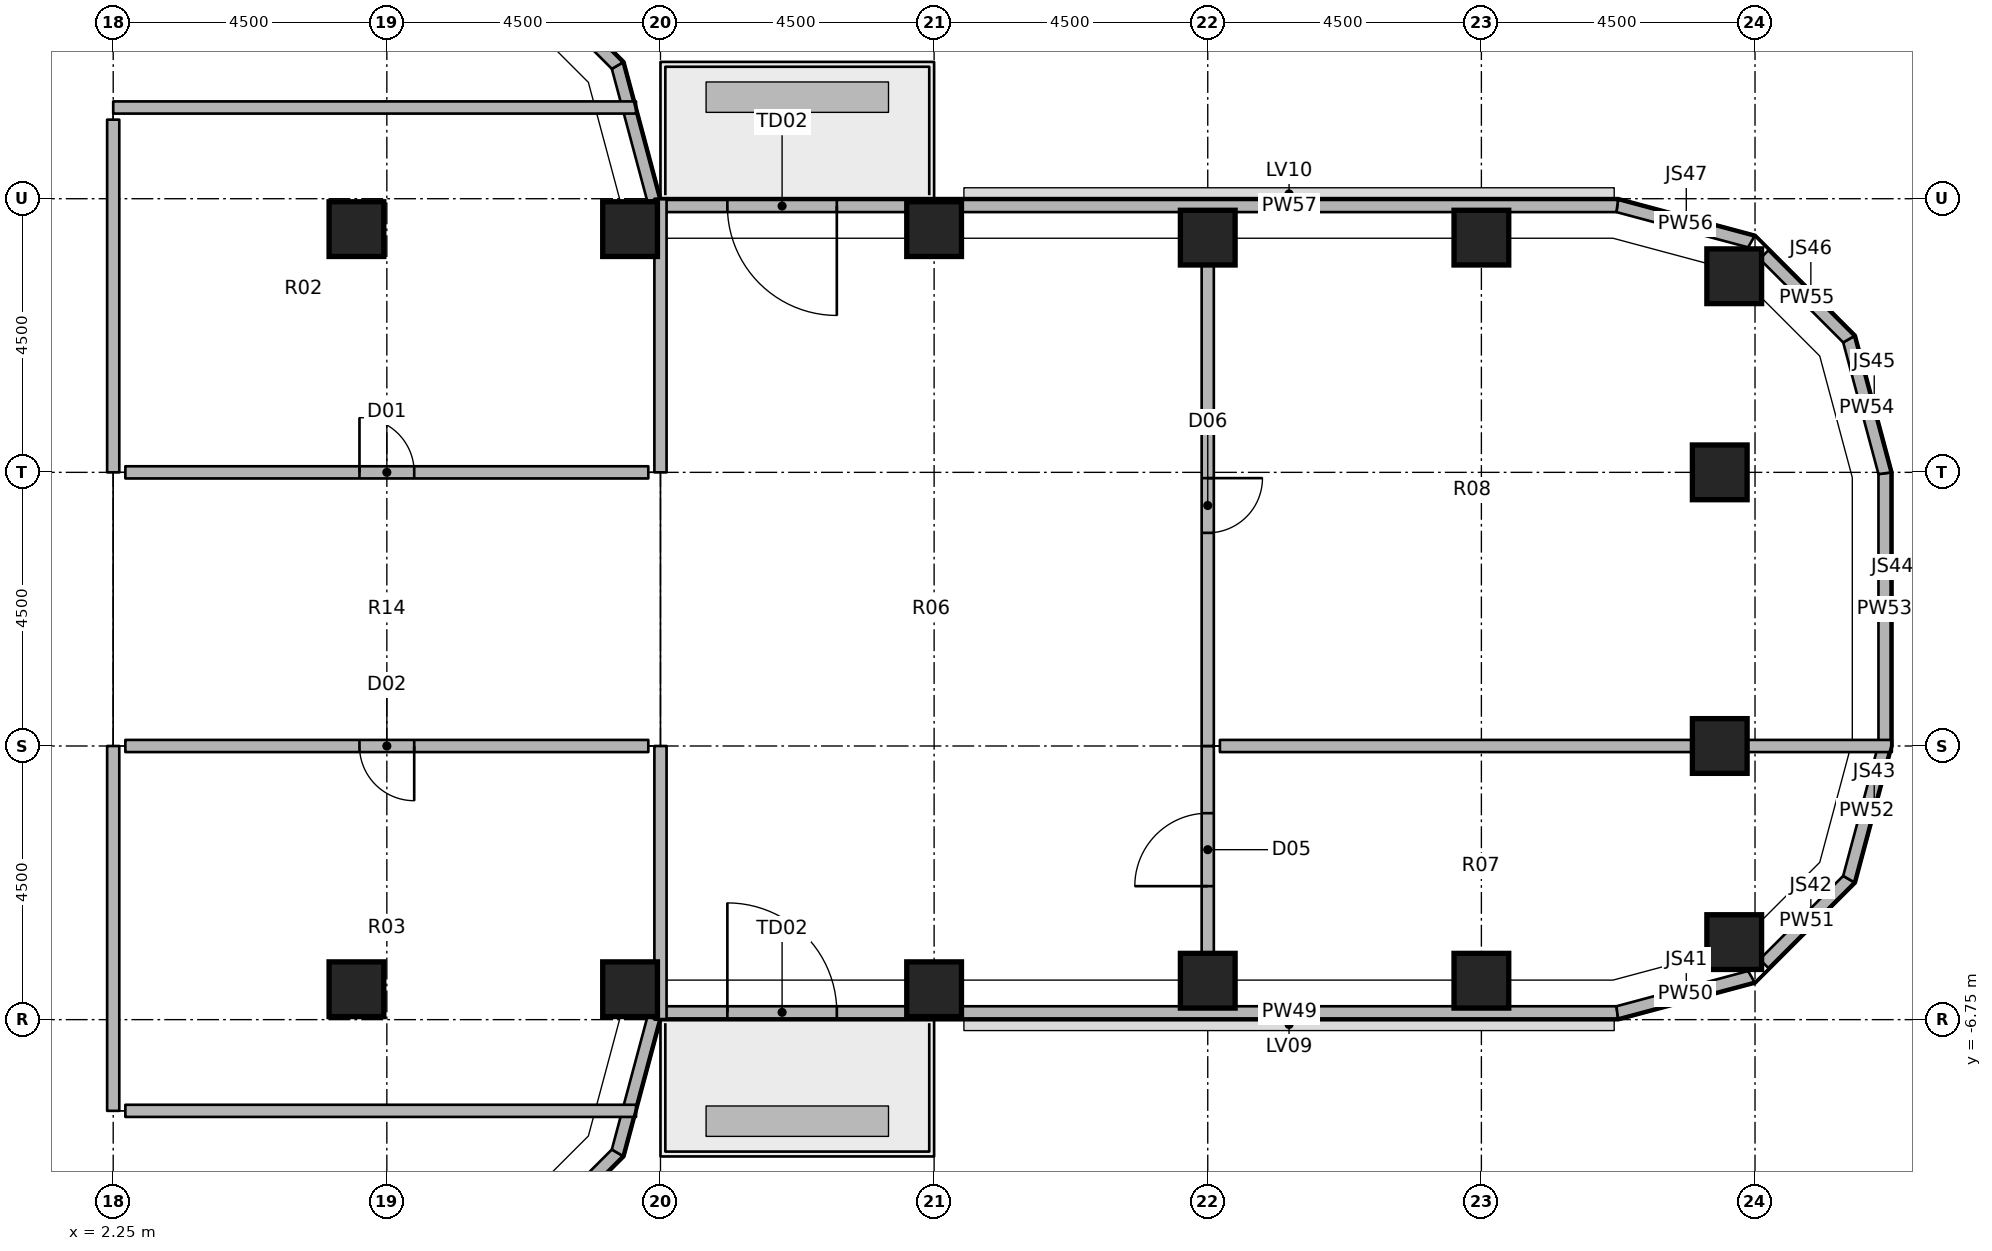
"""IFC4 building model, lengths in metres.
Left out: names, types, materials, properties, quantities, classifications, styles, units other than length and angle.
Written with IfcOpenShell. Run it as: python <this file> out.ifc"""

import sys

from ifc_helpers import new_model, si_unit, direction, frame, frame_2d, origin, origin_2d, place, context, subcontext, project, spatial, polyline, rectangle, outline, extrude, element, fill, save


model = new_model("IFC4")
c1 = context("Model", 3, precision=1e-05, world=origin(), true_north=direction((0.0, 1.0)))
c2 = subcontext(c1, "Body", "Model", "MODEL_VIEW")
j1 = project(units=[si_unit("LENGTHUNIT", "METRE"), si_unit("PLANEANGLEUNIT", "RADIAN")], contexts=[c1])
p1 = place(None, origin())
s1 = spatial("IfcSite", under=j1, at=p1, CompositionType="ELEMENT")
p2 = place(p1, origin())
s2 = spatial("IfcBuilding", under=s1, at=p2, CompositionType="ELEMENT")
p3 = place(p2, frame((0.0, 0.0, 136.0)))
s3 = spatial("IfcBuildingStorey", under=s2, at=p3, CompositionType="ELEMENT", Elevation=136.0)
for number, where, z_axis, x_axis in (
    (1, (6.25, -6.25, 0.0), (0.0, 0.0, 1.0), (1.0, 0.0, 0.0)),
    (2, (6.25, 6.25, 0.0), (0.0, 0.0, 1.0), (1.0, 0.0, 0.0)),
    (3, (10.75, -6.25, 0.0), (0.0, 0.0, 1.0), (1.0, 0.0, 0.0)),
    (4, (10.75, 6.25, 0.0), (0.0, 0.0, 1.0), (1.0, 0.0, 0.0)),
    (5, (15.75, -6.25, 0.0), (0.0, 0.0, 1.0), (1.0, 0.0, 0.0)),
    (6, (15.75, 6.25, 0.0), (0.0, 0.0, 1.0), (1.0, 0.0, 0.0)),
    (7, (20.25, -6.11, 0.0), (0.0, 0.0, 1.0), (1.0, 0.0, 0.0)),
    (8, (20.25, 6.11, 0.0), (0.0, 0.0, 1.0), (1.0, 0.0, 0.0)),
    (9, (24.75, -6.11, 0.0), (0.0, 0.0, 1.0), (1.0, 0.0, 0.0)),
    (10, (24.75, 6.11, 0.0), (0.0, 0.0, 1.0), (1.0, 0.0, 0.0)),
    (11, (28.908, -5.475, 0.0), (0.0, 0.0, 1.0), (1.0, 0.0, 0.0)),
    (12, (28.67, -2.25, 0.0), (0.0, 0.0, 1.0), (1.0, 0.0, 0.0)),
    (13, (28.67, 2.25, 0.0), (0.0, 0.0, 1.0), (1.0, 0.0, 0.0)),
    (14, (28.908, 5.475, 0.0), (0.0, 0.0, 1.0), (1.0, 0.0, 0.0)),
):
    element("IfcColumn", number, at=place(p3, frame(where, z_axis=z_axis, x_axis=x_axis)), inside=s3, PredefinedType="COLUMN", context=c2, shape_type="SweptSolid", body=[
        extrude(rectangle(XDim=0.9, YDim=0.9, at=origin_2d()), origin(), (0.0, 0.0, 1.0), 4.85),
    ])
p4 = place(p3, origin())
e15 = element("IfcWall", 15, at=p4, inside=s3, PredefinedType="SOLIDWALL", context=c2, shape_type="SweptSolid", body=[
    extrude(outline(polyline([(8.99, -10.629), (10.629, -8.99), (10.45, -8.886), (8.886, -10.45), (8.99, -10.629)])), origin(), (0.0, 0.0, 1.0), 4.85),
])
p5 = place(p3, origin())
e16 = element("IfcWall", 16, at=p5, inside=s3, PredefinedType="SOLIDWALL", context=c2, shape_type="SweptSolid", body=[
    extrude(outline(polyline([(10.629, -8.99), (11.229, -6.752), (11.035, -6.701), (10.45, -8.886), (10.629, -8.99)])), origin(), (0.0, 0.0, 1.0), 4.85),
])
p6 = place(p3, frame((11.2, -6.63, 0.0), z_axis=(0.0, 0.0, 1.0), x_axis=(1.0, 0.0, 0.0)))
e17 = element("IfcWall", 17, at=p6, inside=s3, PredefinedType="SOLIDWALL", context=c2, shape_type="SweptSolid", body=[
    extrude(rectangle(XDim=4.1, YDim=0.2, at=frame_2d((2.05, 0.0))), origin(), (0.0, 0.0, 1.0), 4.85),
])
p7 = place(p6, frame((1.15, 0.0, 0.0)))
e18 = element("IfcOpeningElement", 18, at=p7, cuts=e17, PredefinedType="OPENING", context=c2, shape_type="SweptSolid", body=[
    extrude(rectangle(XDim=1.8, YDim=2.4, at=frame_2d((0.9, 1.2))), frame((0.0, 0.11, 0.0), z_axis=(0.0, -1.0, 0.0), x_axis=(1.0, 0.0, 0.0)), (0.0, 0.0, 1.0), 0.22),
])
p8 = place(p3, origin())
e19 = element("IfcWall", 19, at=p8, inside=s3, PredefinedType="SOLIDWALL", context=c2, shape_type="SweptSolid", body=[
    extrude(outline(polyline([(16.2, -6.73), (26.997, -6.73), (26.971, -6.53), (16.2, -6.53), (16.2, -6.73)])), origin(), (0.0, 0.0, 1.0), 4.85),
])
p9 = place(p3, origin())
e20 = element("IfcWall", 20, at=p9, inside=s3, PredefinedType="SOLIDWALL", context=c2, shape_type="SweptSolid", body=[
    extrude(outline(polyline([(26.997, -6.73), (29.24, -6.129), (29.136, -5.95), (26.971, -6.53), (26.997, -6.73)])), origin(), (0.0, 0.0, 1.0), 4.85),
])
p10 = place(p3, origin())
e21 = element("IfcWall", 21, at=p10, inside=s3, PredefinedType="SOLIDWALL", context=c2, shape_type="SweptSolid", body=[
    extrude(outline(polyline([(29.469, -5.9), (30.879, -4.49), (30.7, -4.386), (29.327, -5.759), (29.469, -5.9)])), origin(), (0.0, 0.0, 1.0), 4.85),
])
p11 = place(p3, origin())
e22 = element("IfcWall", 22, at=p11, inside=s3, PredefinedType="SOLIDWALL", context=c2, shape_type="SweptSolid", body=[
    extrude(outline(polyline([(30.879, -4.49), (31.48, -2.247), (31.28, -2.221), (30.7, -4.386), (30.879, -4.49)])), origin(), (0.0, 0.0, 1.0), 4.85),
])
p12 = place(p3, origin())
e23 = element("IfcWall", 23, at=p12, inside=s3, PredefinedType="SOLIDWALL", context=c2, shape_type="SweptSolid", body=[
    extrude(outline(polyline([(31.48, -2.247), (31.48, 2.247), (31.28, 2.221), (31.28, -2.221), (31.48, -2.247)])), origin(), (0.0, 0.0, 1.0), 4.85),
])
p13 = place(p3, origin())
e24 = element("IfcWall", 24, at=p13, inside=s3, PredefinedType="SOLIDWALL", context=c2, shape_type="SweptSolid", body=[
    extrude(outline(polyline([(31.48, 2.247), (30.879, 4.49), (30.7, 4.386), (31.28, 2.221), (31.48, 2.247)])), origin(), (0.0, 0.0, 1.0), 4.85),
])
p14 = place(p3, origin())
e25 = element("IfcWall", 25, at=p14, inside=s3, PredefinedType="SOLIDWALL", context=c2, shape_type="SweptSolid", body=[
    extrude(outline(polyline([(30.879, 4.49), (29.469, 5.9), (29.327, 5.759), (30.7, 4.386), (30.879, 4.49)])), origin(), (0.0, 0.0, 1.0), 4.85),
])
p15 = place(p3, origin())
e26 = element("IfcWall", 26, at=p15, inside=s3, PredefinedType="SOLIDWALL", context=c2, shape_type="SweptSolid", body=[
    extrude(outline(polyline([(29.24, 6.129), (26.997, 6.73), (26.971, 6.53), (29.136, 5.95), (29.24, 6.129)])), origin(), (0.0, 0.0, 1.0), 4.85),
])
p16 = place(p3, origin())
e27 = element("IfcWall", 27, at=p16, inside=s3, PredefinedType="SOLIDWALL", context=c2, shape_type="SweptSolid", body=[
    extrude(outline(polyline([(26.997, 6.73), (16.2, 6.73), (16.2, 6.53), (26.971, 6.53), (26.997, 6.73)])), origin(), (0.0, 0.0, 1.0), 4.85),
])
p17 = place(p3, frame((15.3, 6.63, 0.0), z_axis=(0.0, 0.0, 1.0), x_axis=(-1.0, 0.0, 0.0)))
e28 = element("IfcWall", 28, at=p17, inside=s3, PredefinedType="SOLIDWALL", context=c2, shape_type="SweptSolid", body=[
    extrude(rectangle(XDim=4.1, YDim=0.2, at=frame_2d((2.05, 0.0))), origin(), (0.0, 0.0, 1.0), 4.85),
])
p18 = place(p17, frame((1.15, 0.0, 0.0)))
e29 = element("IfcOpeningElement", 29, at=p18, cuts=e28, PredefinedType="OPENING", context=c2, shape_type="SweptSolid", body=[
    extrude(rectangle(XDim=1.8, YDim=2.4, at=frame_2d((0.9, 1.2))), frame((0.0, 0.11, 0.0), z_axis=(0.0, -1.0, 0.0), x_axis=(1.0, 0.0, 0.0)), (0.0, 0.0, 1.0), 0.22),
])
p19 = place(p3, origin())
e30 = element("IfcWall", 30, at=p19, inside=s3, PredefinedType="SOLIDWALL", context=c2, shape_type="SweptSolid", body=[
    extrude(outline(polyline([(11.229, 6.752), (10.629, 8.99), (10.45, 8.886), (11.035, 6.701), (11.229, 6.752)])), origin(), (0.0, 0.0, 1.0), 4.85),
])
p20 = place(p3, origin())
e31 = element("IfcWall", 31, at=p20, inside=s3, PredefinedType="SOLIDWALL", context=c2, shape_type="SweptSolid", body=[
    extrude(outline(polyline([(10.629, 8.99), (8.99, 10.629), (8.886, 10.45), (10.45, 8.886), (10.629, 8.99)])), origin(), (0.0, 0.0, 1.0), 4.85),
])
p21 = place(p3, frame((10.848, 8.25, 0.0), z_axis=(0.0, 0.0, 1.0), x_axis=(-1.0, 0.0, 0.0)))
e32 = element("IfcWall", 32, at=p21, inside=s3, PredefinedType="PARTITIONING", context=c2, shape_type="SweptSolid", body=[
    extrude(rectangle(XDim=8.598, YDim=0.2, at=frame_2d((4.299, 0.0))), origin(), (0.0, 0.0, 1.0), 3.93),
])
p22 = place(p3, frame((2.25, 8.05, 0.0), z_axis=(0.0, 0.0, 1.0), x_axis=(0.0, -1.0, 0.0)))
e33 = element("IfcWall", 33, at=p22, inside=s3, PredefinedType="PARTITIONING", context=c2, shape_type="SweptSolid", body=[
    extrude(rectangle(XDim=5.8, YDim=0.2, at=frame_2d((2.9, 0.0))), origin(), (0.0, 0.0, 1.0), 3.994),
])
p23 = place(p3, frame((2.25, -2.25, 0.0), z_axis=(0.0, 0.0, 1.0), x_axis=(0.0, -1.0, 0.0)))
e34 = element("IfcWall", 34, at=p23, inside=s3, PredefinedType="PARTITIONING", context=c2, shape_type="SweptSolid", body=[
    extrude(rectangle(XDim=6.0, YDim=0.2, at=frame_2d((3.0, 0.0))), origin(), (0.0, 0.0, 1.0), 3.994),
])
p24 = place(p3, frame((2.45, -8.25, 0.0), z_axis=(0.0, 0.0, 1.0), x_axis=(1.0, 0.0, 0.0)))
e35 = element("IfcWall", 35, at=p24, inside=s3, PredefinedType="PARTITIONING", context=c2, shape_type="SweptSolid", body=[
    extrude(rectangle(XDim=8.398, YDim=0.2, at=frame_2d((4.199, 0.0))), origin(), (0.0, 0.0, 1.0), 3.93),
])
p25 = place(p3, frame((11.25, 6.75, 0.0), z_axis=(0.0, 0.0, 1.0), x_axis=(0.0, -1.0, 0.0)))
e36 = element("IfcWall", 36, at=p25, inside=s3, PredefinedType="PARTITIONING", context=c2, shape_type="SweptSolid", body=[
    extrude(rectangle(XDim=4.5, YDim=0.2, at=frame_2d((2.25, 0.0))), origin(), (0.0, 0.0, 1.0), 3.93),
])
p26 = place(p3, frame((2.45, 2.25, 0.0), z_axis=(0.0, 0.0, 1.0), x_axis=(1.0, 0.0, 0.0)))
e37 = element("IfcWall", 37, at=p26, inside=s3, PredefinedType="PARTITIONING", context=c2, shape_type="SweptSolid", body=[
    extrude(rectangle(XDim=8.6, YDim=0.2, at=frame_2d((4.3, 0.0))), origin(), (0.0, 0.0, 1.0), 4.081),
])
p27 = place(p26, frame((3.85, 0.0, 0.0)))
e38 = element("IfcOpeningElement", 38, at=p27, cuts=e37, PredefinedType="OPENING", context=c2, shape_type="SweptSolid", body=[
    extrude(rectangle(XDim=0.9, YDim=2.1, at=frame_2d((0.45, 1.05))), frame((0.0, 0.11, 0.0), z_axis=(0.0, -1.0, 0.0), x_axis=(1.0, 0.0, 0.0)), (0.0, 0.0, 1.0), 0.22),
])
p28 = place(p3, frame((11.25, -2.25, 0.0), z_axis=(0.0, 0.0, 1.0), x_axis=(0.0, -1.0, 0.0)))
e39 = element("IfcWall", 39, at=p28, inside=s3, PredefinedType="PARTITIONING", context=c2, shape_type="SweptSolid", body=[
    extrude(rectangle(XDim=4.5, YDim=0.2, at=frame_2d((2.25, 0.0))), origin(), (0.0, 0.0, 1.0), 3.93),
])
p29 = place(p3, frame((11.05, -2.25, 0.0), z_axis=(0.0, 0.0, 1.0), x_axis=(-1.0, 0.0, 0.0)))
e40 = element("IfcWall", 40, at=p29, inside=s3, PredefinedType="PARTITIONING", context=c2, shape_type="SweptSolid", body=[
    extrude(rectangle(XDim=8.6, YDim=0.2, at=frame_2d((4.3, 0.0))), origin(), (0.0, 0.0, 1.0), 4.081),
])
p30 = place(p29, frame((3.85, 0.0, 0.0)))
e41 = element("IfcOpeningElement", 41, at=p30, cuts=e40, PredefinedType="OPENING", context=c2, shape_type="SweptSolid", body=[
    extrude(rectangle(XDim=0.9, YDim=2.1, at=frame_2d((0.45, 1.05))), frame((0.0, 0.11, 0.0), z_axis=(0.0, -1.0, 0.0), x_axis=(1.0, 0.0, 0.0)), (0.0, 0.0, 1.0), 0.22),
])
p31 = place(p3, frame((20.25, -5.66, 0.0), z_axis=(0.0, 0.0, 1.0), x_axis=(0.0, 1.0, 0.0)))
e42 = element("IfcWall", 42, at=p31, inside=s3, PredefinedType="PARTITIONING", context=c2, shape_type="SweptSolid", body=[
    extrude(rectangle(XDim=3.41, YDim=0.2, at=frame_2d((1.705, 0.0))), origin(), (0.0, 0.0, 1.0), 4.081),
])
p32 = place(p31, frame((1.105, 0.0, 0.0)))
e43 = element("IfcOpeningElement", 43, at=p32, cuts=e42, PredefinedType="OPENING", context=c2, shape_type="SweptSolid", body=[
    extrude(rectangle(XDim=1.2, YDim=2.1, at=frame_2d((0.6, 1.05))), frame((0.0, 0.11, 0.0), z_axis=(0.0, -1.0, 0.0), x_axis=(1.0, 0.0, 0.0)), (0.0, 0.0, 1.0), 0.22),
])
p33 = place(p3, frame((20.25, 5.66, 0.0), z_axis=(0.0, 0.0, 1.0), x_axis=(0.0, -1.0, 0.0)))
e44 = element("IfcWall", 44, at=p33, inside=s3, PredefinedType="PARTITIONING", context=c2, shape_type="SweptSolid", body=[
    extrude(rectangle(XDim=7.91, YDim=0.2, at=frame_2d((3.955, 0.0))), origin(), (0.0, 0.0, 1.0), 4.081),
])
p34 = place(p33, frame((3.505, 0.0, 0.0)))
e45 = element("IfcOpeningElement", 45, at=p34, cuts=e44, PredefinedType="OPENING", context=c2, shape_type="SweptSolid", body=[
    extrude(rectangle(XDim=0.9, YDim=2.1, at=frame_2d((0.45, 1.05))), frame((0.0, 0.11, 0.0), z_axis=(0.0, -1.0, 0.0), x_axis=(1.0, 0.0, 0.0)), (0.0, 0.0, 1.0), 0.22),
])
p35 = place(p3, frame((20.45, -2.25, 0.0), z_axis=(0.0, 0.0, 1.0), x_axis=(1.0, 0.0, 0.0)))
e46 = element("IfcWall", 46, at=p35, inside=s3, PredefinedType="PARTITIONING", context=c2, shape_type="SweptSolid", body=[
    extrude(rectangle(XDim=7.77, YDim=0.2, at=frame_2d((3.885, 0.0))), origin(), (0.0, 0.0, 1.0), 4.081),
])
p36 = place(p3, frame((29.12, -2.25, 0.0), z_axis=(0.0, 0.0, 1.0), x_axis=(1.0, 0.0, 0.0)))
e47 = element("IfcWall", 47, at=p36, inside=s3, PredefinedType="PARTITIONING", context=c2, shape_type="SweptSolid", body=[
    extrude(rectangle(XDim=2.38, YDim=0.2, at=frame_2d((1.19, 0.0))), origin(), (0.0, 0.0, 1.0), 3.994),
])
p37 = place(p7, origin())
e48 = element("IfcDoor", 48, at=p37, inside=s3, OperationType="SINGLE_SWING_LEFT", PredefinedType="DOOR", context=c2, shape_type="SweptSolid", body=[
    extrude(rectangle(XDim=1.8, YDim=2.4, at=frame_2d((0.9, 1.2))), frame((0.0, 0.025, 0.0), z_axis=(0.0, -1.0, 0.0), x_axis=(1.0, 0.0, 0.0)), (0.0, 0.0, 1.0), 0.05),
])
fill(e18, e48)
p38 = place(p18, origin())
e49 = element("IfcDoor", 49, at=p38, inside=s3, OperationType="SINGLE_SWING_LEFT", PredefinedType="DOOR", context=c2, shape_type="SweptSolid", body=[
    extrude(rectangle(XDim=1.8, YDim=2.4, at=frame_2d((0.9, 1.2))), frame((0.0, 0.025, 0.0), z_axis=(0.0, -1.0, 0.0), x_axis=(1.0, 0.0, 0.0)), (0.0, 0.0, 1.0), 0.05),
])
fill(e29, e49)
p39 = place(p27, origin())
e50 = element("IfcDoor", 50, at=p39, inside=s3, OperationType="SINGLE_SWING_LEFT", PredefinedType="DOOR", context=c2, shape_type="SweptSolid", body=[
    extrude(rectangle(XDim=0.9, YDim=2.1, at=frame_2d((0.45, 1.05))), frame((0.0, 0.025, 0.0), z_axis=(0.0, -1.0, 0.0), x_axis=(1.0, 0.0, 0.0)), (0.0, 0.0, 1.0), 0.05),
])
fill(e38, e50)
p40 = place(p30, origin())
e51 = element("IfcDoor", 51, at=p40, inside=s3, OperationType="SINGLE_SWING_LEFT", PredefinedType="DOOR", context=c2, shape_type="SweptSolid", body=[
    extrude(rectangle(XDim=0.9, YDim=2.1, at=frame_2d((0.45, 1.05))), frame((0.0, 0.025, 0.0), z_axis=(0.0, -1.0, 0.0), x_axis=(1.0, 0.0, 0.0)), (0.0, 0.0, 1.0), 0.05),
])
fill(e41, e51)
p41 = place(p32, origin())
e52 = element("IfcDoor", 52, at=p41, inside=s3, OperationType="SINGLE_SWING_LEFT", PredefinedType="DOOR", context=c2, shape_type="SweptSolid", body=[
    extrude(rectangle(XDim=1.2, YDim=2.1, at=frame_2d((0.6, 1.05))), frame((0.0, 0.025, 0.0), z_axis=(0.0, -1.0, 0.0), x_axis=(1.0, 0.0, 0.0)), (0.0, 0.0, 1.0), 0.05),
])
fill(e43, e52)
p42 = place(p34, origin())
e53 = element("IfcDoor", 53, at=p42, inside=s3, OperationType="SINGLE_SWING_LEFT", PredefinedType="DOOR", context=c2, shape_type="SweptSolid", body=[
    extrude(rectangle(XDim=0.9, YDim=2.1, at=frame_2d((0.45, 1.05))), frame((0.0, 0.025, 0.0), z_axis=(0.0, -1.0, 0.0), x_axis=(1.0, 0.0, 0.0)), (0.0, 0.0, 1.0), 0.05),
])
fill(e45, e53)
save(model, sys.argv[1])
